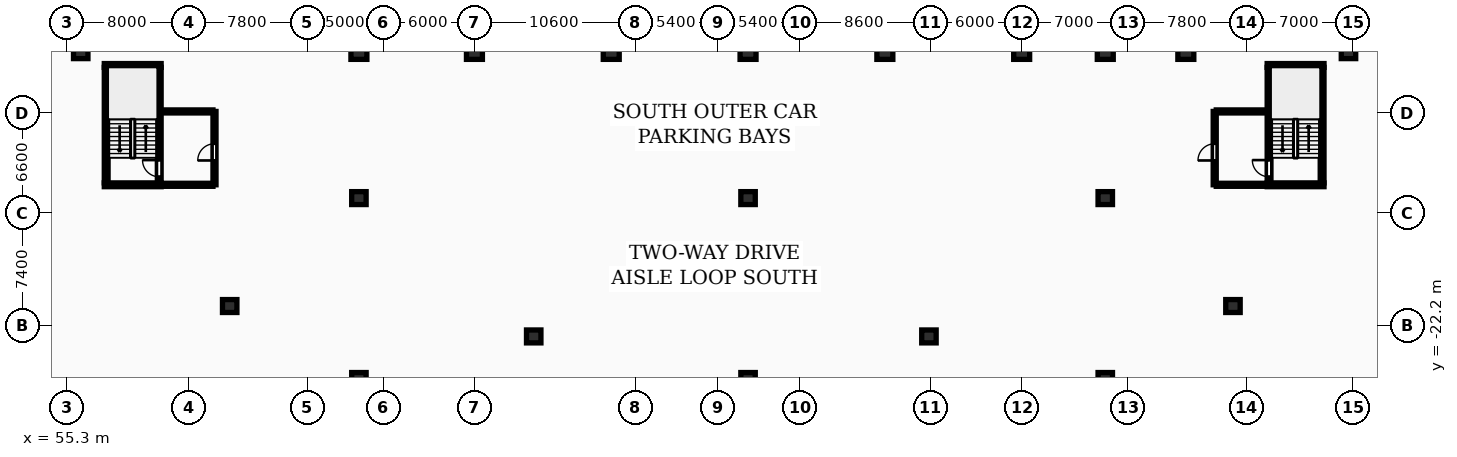
"""IFC4 building model, lengths in metres.
Left out: names, types, materials, properties, quantities, classifications, styles, units other than length and angle.
Written with IfcOpenShell. Run it as: python <this file> out.ifc"""

import sys

from ifc_helpers import new_model, si_unit, direction, frame, frame_2d, origin, origin_2d, place, context, subcontext, project, spatial, rectangle, extrude, element, fill, save


model = new_model("IFC4")
c1 = context("Model", 3, precision=1e-05, world=origin(), true_north=direction((0.0, 1.0)))
c2 = subcontext(c1, "Body", "Model", "MODEL_VIEW")
j1 = project(units=[si_unit("LENGTHUNIT", "METRE"), si_unit("PLANEANGLEUNIT", "RADIAN")], contexts=[c1])
p1 = place(None, origin())
s1 = spatial("IfcSite", under=j1, at=p1, CompositionType="ELEMENT")
p2 = place(p1, origin())
s2 = spatial("IfcBuilding", under=s1, at=p2, CompositionType="ELEMENT")
p3 = place(p2, frame((0.0, 0.0, -7.2)))
s3 = spatial("IfcBuildingStorey", under=s2, at=p3, CompositionType="ELEMENT", Elevation=-7.2)
for number, where, z_axis, x_axis in (
    (1, (74.5, -4.2, 0.0), (0.0, 0.0, 1.0), (1.0, 0.0, 0.0)),
    (2, (82.1, -4.2, 0.0), (0.0, 0.0, 1.0), (1.0, 0.0, 0.0)),
    (3, (91.1, -4.2, 0.0), (0.0, 0.0, 1.0), (1.0, 0.0, 0.0)),
    (4, (100.1, -4.2, 0.0), (0.0, 0.0, 1.0), (1.0, 0.0, 0.0)),
    (5, (109.1, -4.2, 0.0), (0.0, 0.0, 1.0), (1.0, 0.0, 0.0)),
    (6, (118.1, -4.2, 0.0), (0.0, 0.0, 1.0), (1.0, 0.0, 0.0)),
    (7, (123.6, -4.2, 0.0), (0.0, 0.0, 1.0), (1.0, 0.0, 0.0)),
    (8, (128.9, -4.2, 0.0), (0.0, 0.0, 1.0), (1.0, 0.0, 0.0)),
):
    element("IfcColumn", number, at=place(p3, frame(where, z_axis=z_axis, x_axis=x_axis)), inside=s3, PredefinedType="COLUMN", context=c2, shape_type="SweptSolid", body=[
        extrude(rectangle(XDim=1.05, YDim=0.95, at=origin_2d()), origin(), (0.0, 0.0, 1.0), 3.6),
    ])
for number, where, z_axis, x_axis in (
    (9, (56.2, -4.2, 0.0), (0.0, 0.0, 1.0), (1.0, 0.0, 0.0)),
    (10, (139.6, -4.2, 0.0), (0.0, 0.0, 1.0), (1.0, 0.0, 0.0)),
    (11, (74.5, -13.8, 0.0), (0.0, 0.0, 1.0), (1.0, 0.0, 0.0)),
    (12, (100.1, -13.8, 0.0), (0.0, 0.0, 1.0), (1.0, 0.0, 0.0)),
    (13, (123.6, -13.8, 0.0), (0.0, 0.0, 1.0), (1.0, 0.0, 0.0)),
    (14, (86.0, -22.9, 0.0), (0.0, 0.0, 1.0), (1.0, 0.0, 0.0)),
    (15, (112.0, -22.9, 0.0), (0.0, 0.0, 1.0), (1.0, 0.0, 0.0)),
    (16, (66.0, -20.9, 0.0), (0.0, 0.0, 1.0), (1.0, 0.0, 0.0)),
    (17, (132.0, -20.9, 0.0), (0.0, 0.0, 1.0), (1.0, 0.0, 0.0)),
    (18, (74.5, -25.7, 0.0), (0.0, 0.0, 1.0), (1.0, 0.0, 0.0)),
    (19, (100.1, -25.7, 0.0), (0.0, 0.0, 1.0), (1.0, 0.0, 0.0)),
    (20, (123.6, -25.7, 0.0), (0.0, 0.0, 1.0), (1.0, 0.0, 0.0)),
):
    element("IfcColumn", number, at=place(p3, frame(where, z_axis=z_axis, x_axis=x_axis)), inside=s3, PredefinedType="COLUMN", context=c2, shape_type="SweptSolid", body=[
        extrude(rectangle(XDim=0.95, YDim=0.85, at=origin_2d()), origin(), (0.0, 0.0, 1.0), 3.6),
    ])
p4 = place(p3, frame((57.875, -12.8, 0.0), z_axis=(0.0, 0.0, 1.0), x_axis=(0.0, 1.0, 0.0)))
e21 = element("IfcWall", 21, at=p4, inside=s3, PredefinedType="SHEAR", context=c2, shape_type="SweptSolid", body=[
    extrude(rectangle(XDim=7.6, YDim=0.25, at=frame_2d((3.8, 0.0))), origin(), (0.0, 0.0, 1.0), 3.6),
])
for number, where, z_axis, x_axis in (
    (22, (57.75, -12.925, 0.0), (0.0, 0.0, 1.0), (1.0, 0.0, 0.0)),
    (23, (57.75, -5.075, 0.0), (0.0, 0.0, 1.0), (1.0, 0.0, 0.0)),
):
    element("IfcWall", number, at=place(p3, frame(where, z_axis=z_axis, x_axis=x_axis)), inside=s3, PredefinedType="SHEAR", context=c2, shape_type="SweptSolid", body=[
        extrude(rectangle(XDim=3.74, YDim=0.25, at=frame_2d((1.87, 0.0))), origin(), (0.0, 0.0, 1.0), 3.6),
    ])
p5 = place(p3, frame((61.365, -12.8, 0.0), z_axis=(0.0, 0.0, 1.0), x_axis=(0.0, 1.0, 0.0)))
e24 = element("IfcWall", 24, at=p5, inside=s3, PredefinedType="SHEAR", context=c2, shape_type="SweptSolid", body=[
    extrude(rectangle(XDim=7.6, YDim=0.25, at=frame_2d((3.8, 0.0))), origin(), (0.0, 0.0, 1.0), 3.6),
])
p6 = place(p5, frame((0.4, 0.0, 0.0)))
e25 = element("IfcOpeningElement", 25, at=p6, cuts=e24, PredefinedType="OPENING", context=c2, shape_type="SweptSolid", body=[
    extrude(rectangle(XDim=1.1, YDim=2.1, at=frame_2d((0.55, 1.05))), frame((0.0, 0.135, 0.0), z_axis=(0.0, -1.0, 0.0), x_axis=(1.0, 0.0, 0.0)), (0.0, 0.0, 1.0), 0.27),
])
p7 = place(p3, frame((65.0, -12.925, 0.0), z_axis=(0.0, 0.0, 1.0), x_axis=(0.0, 1.0, 0.0)))
e26 = element("IfcWall", 26, at=p7, inside=s3, PredefinedType="PARTITIONING", context=c2, shape_type="SweptSolid", body=[
    extrude(rectangle(XDim=4.825, YDim=0.2, at=frame_2d((2.413, 0.0))), origin(), (0.0, 0.0, 1.0), 3.3),
])
p8 = place(p7, frame((1.6, 0.0, 0.0)))
e27 = element("IfcOpeningElement", 27, at=p8, cuts=e26, PredefinedType="OPENING", context=c2, shape_type="SweptSolid", body=[
    extrude(rectangle(XDim=1.1, YDim=2.15, at=frame_2d((0.55, 1.075))), frame((0.0, 0.11, 0.0), z_axis=(0.0, -1.0, 0.0), x_axis=(1.0, 0.0, 0.0)), (0.0, 0.0, 1.0), 0.22),
])
for number, where, z_axis, x_axis in (
    (28, (61.5, -12.925, 0.0), (0.0, 0.0, 1.0), (1.0, 0.0, 0.0)),
    (29, (61.5, -8.1, 0.0), (0.0, 0.0, 1.0), (1.0, 0.0, 0.0)),
):
    element("IfcWall", number, at=place(p3, frame(where, z_axis=z_axis, x_axis=x_axis)), inside=s3, PredefinedType="PARTITIONING", context=c2, shape_type="SweptSolid", body=[
        extrude(rectangle(XDim=3.4, YDim=0.2, at=frame_2d((1.7, 0.0))), origin(), (0.0, 0.0, 1.0), 3.3),
    ])
p9 = place(p3, frame((134.375, -12.8, 0.0), z_axis=(0.0, 0.0, 1.0), x_axis=(0.0, 1.0, 0.0)))
e30 = element("IfcWall", 30, at=p9, inside=s3, PredefinedType="SHEAR", context=c2, shape_type="SweptSolid", body=[
    extrude(rectangle(XDim=7.6, YDim=0.25, at=frame_2d((3.8, 0.0))), origin(), (0.0, 0.0, 1.0), 3.6),
])
p10 = place(p9, frame((0.4, 0.0, 0.0)))
e31 = element("IfcOpeningElement", 31, at=p10, cuts=e30, PredefinedType="OPENING", context=c2, shape_type="SweptSolid", body=[
    extrude(rectangle(XDim=1.1, YDim=2.1, at=frame_2d((0.55, 1.05))), frame((0.0, 0.135, 0.0), z_axis=(0.0, -1.0, 0.0), x_axis=(1.0, 0.0, 0.0)), (0.0, 0.0, 1.0), 0.27),
])
p11 = place(p3, frame((137.865, -12.8, 0.0), z_axis=(0.0, 0.0, 1.0), x_axis=(0.0, 1.0, 0.0)))
e32 = element("IfcWall", 32, at=p11, inside=s3, PredefinedType="SHEAR", context=c2, shape_type="SweptSolid", body=[
    extrude(rectangle(XDim=7.6, YDim=0.25, at=frame_2d((3.8, 0.0))), origin(), (0.0, 0.0, 1.0), 3.6),
])
for number, where, z_axis, x_axis in (
    (33, (134.25, -12.925, 0.0), (0.0, 0.0, 1.0), (1.0, 0.0, 0.0)),
    (34, (134.25, -5.075, 0.0), (0.0, 0.0, 1.0), (1.0, 0.0, 0.0)),
):
    element("IfcWall", number, at=place(p3, frame(where, z_axis=z_axis, x_axis=x_axis)), inside=s3, PredefinedType="SHEAR", context=c2, shape_type="SweptSolid", body=[
        extrude(rectangle(XDim=3.74, YDim=0.25, at=frame_2d((1.87, 0.0))), origin(), (0.0, 0.0, 1.0), 3.6),
    ])
p12 = place(p3, frame((130.8, -12.925, 0.0), z_axis=(0.0, 0.0, 1.0), x_axis=(0.0, 1.0, 0.0)))
e35 = element("IfcWall", 35, at=p12, inside=s3, PredefinedType="PARTITIONING", context=c2, shape_type="SweptSolid", body=[
    extrude(rectangle(XDim=4.825, YDim=0.2, at=frame_2d((2.413, 0.0))), origin(), (0.0, 0.0, 1.0), 3.3),
])
p13 = place(p12, frame((1.6, 0.0, 0.0)))
e36 = element("IfcOpeningElement", 36, at=p13, cuts=e35, PredefinedType="OPENING", context=c2, shape_type="SweptSolid", body=[
    extrude(rectangle(XDim=1.1, YDim=2.15, at=frame_2d((0.55, 1.075))), frame((0.0, 0.11, 0.0), z_axis=(0.0, -1.0, 0.0), x_axis=(1.0, 0.0, 0.0)), (0.0, 0.0, 1.0), 0.22),
])
for number, where, z_axis, x_axis in (
    (37, (130.9, -12.925, 0.0), (0.0, 0.0, 1.0), (1.0, 0.0, 0.0)),
    (38, (130.9, -8.1, 0.0), (0.0, 0.0, 1.0), (1.0, 0.0, 0.0)),
):
    element("IfcWall", number, at=place(p3, frame(where, z_axis=z_axis, x_axis=x_axis)), inside=s3, PredefinedType="PARTITIONING", context=c2, shape_type="SweptSolid", body=[
        extrude(rectangle(XDim=3.35, YDim=0.2, at=frame_2d((1.675, 0.0))), origin(), (0.0, 0.0, 1.0), 3.3),
    ])
p14 = place(p6, origin())
e39 = element("IfcDoor", 39, at=p14, inside=s3, OperationType="SINGLE_SWING_RIGHT", PredefinedType="DOOR", context=c2, shape_type="SweptSolid", body=[
    extrude(rectangle(XDim=1.1, YDim=2.1, at=frame_2d((0.55, 1.05))), frame((0.0, 0.025, 0.0), z_axis=(0.0, -1.0, 0.0), x_axis=(1.0, 0.0, 0.0)), (0.0, 0.0, 1.0), 0.05),
])
fill(e25, e39)
p15 = place(p8, origin())
e40 = element("IfcDoor", 40, at=p15, inside=s3, OperationType="SINGLE_SWING_LEFT", PredefinedType="DOOR", context=c2, shape_type="SweptSolid", body=[
    extrude(rectangle(XDim=1.1, YDim=2.15, at=frame_2d((0.55, 1.075))), frame((0.0, 0.025, 0.0), z_axis=(0.0, -1.0, 0.0), x_axis=(1.0, 0.0, 0.0)), (0.0, 0.0, 1.0), 0.05),
])
fill(e27, e40)
p16 = place(p10, origin())
e41 = element("IfcDoor", 41, at=p16, inside=s3, OperationType="SINGLE_SWING_RIGHT", PredefinedType="DOOR", context=c2, shape_type="SweptSolid", body=[
    extrude(rectangle(XDim=1.1, YDim=2.1, at=frame_2d((0.55, 1.05))), frame((0.0, 0.025, 0.0), z_axis=(0.0, -1.0, 0.0), x_axis=(1.0, 0.0, 0.0)), (0.0, 0.0, 1.0), 0.05),
])
fill(e31, e41)
p17 = place(p13, origin())
e42 = element("IfcDoor", 42, at=p17, inside=s3, OperationType="SINGLE_SWING_LEFT", PredefinedType="DOOR", context=c2, shape_type="SweptSolid", body=[
    extrude(rectangle(XDim=1.1, YDim=2.15, at=frame_2d((0.55, 1.075))), frame((0.0, 0.025, 0.0), z_axis=(0.0, -1.0, 0.0), x_axis=(1.0, 0.0, 0.0)), (0.0, 0.0, 1.0), 0.05),
])
fill(e36, e42)
save(model, sys.argv[1])
